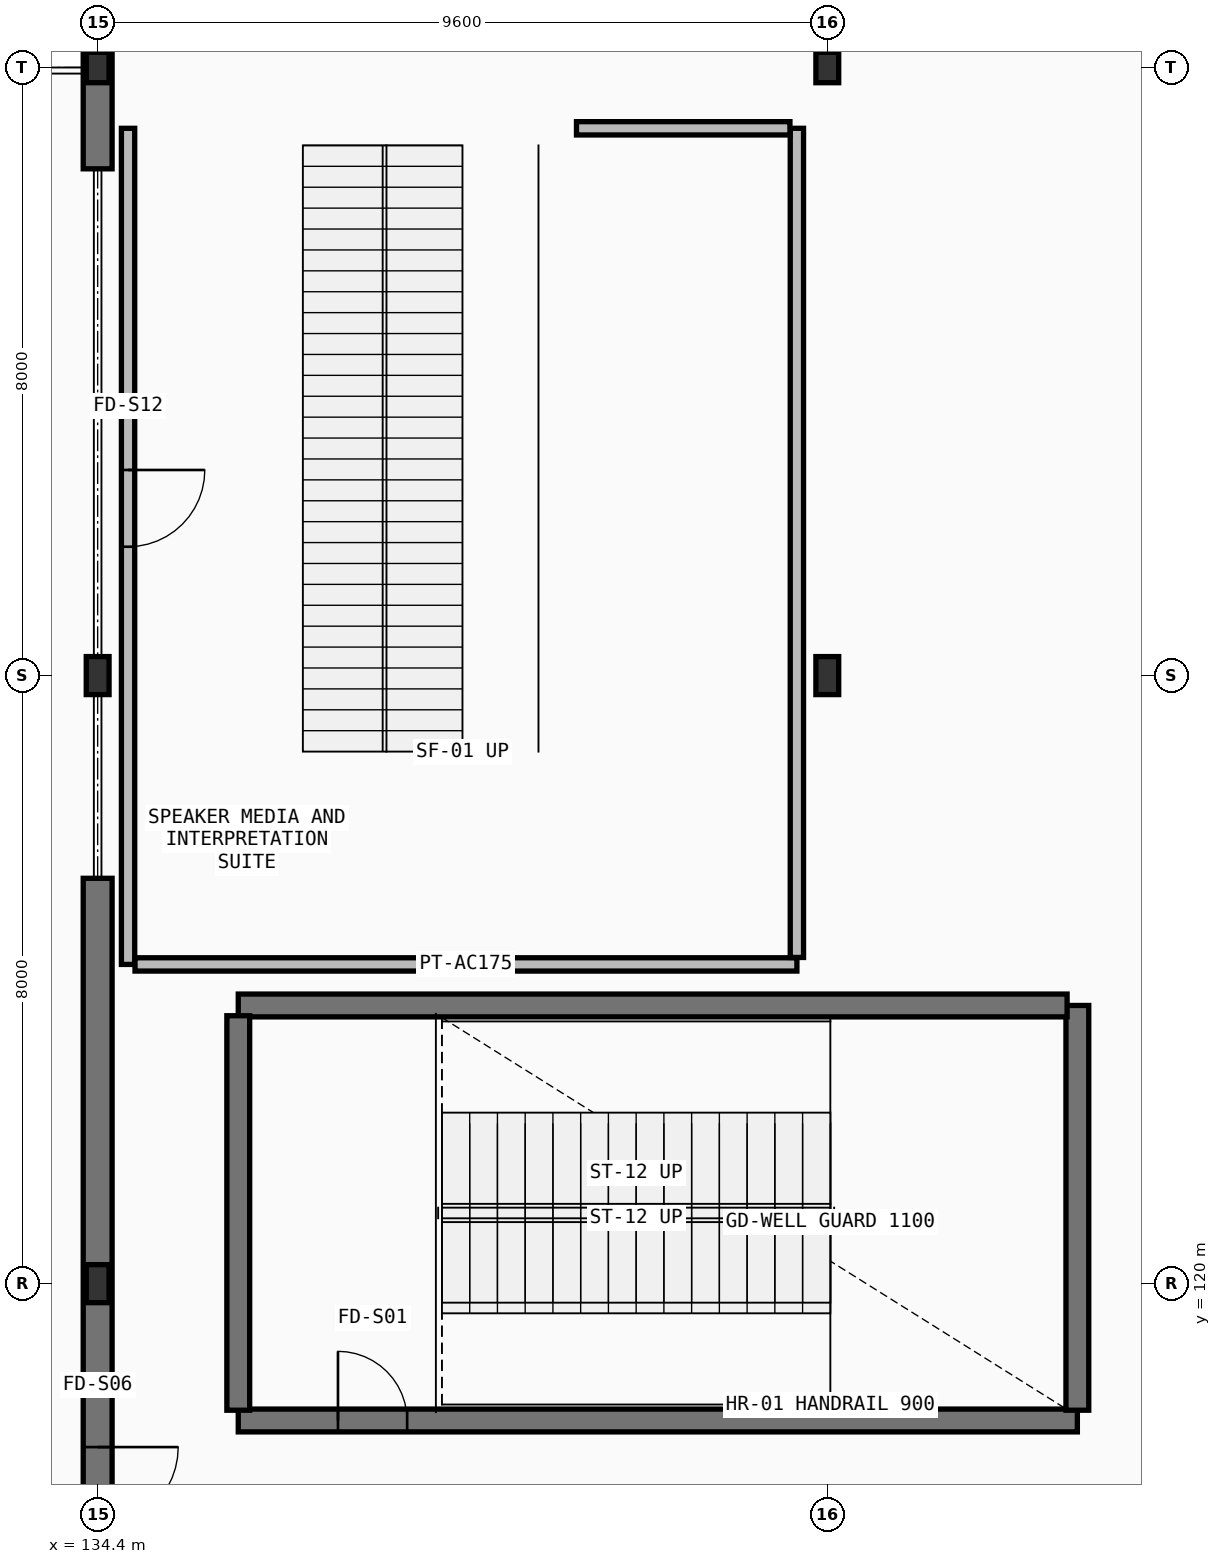
"""IFC4 building model, lengths in metres.
Left out: names, types, materials, properties, quantities, classifications, styles, units other than length and angle.
Written with IfcOpenShell. Run it as: python <this file> out.ifc"""

import sys

from ifc_helpers import new_model, si_unit, direction, frame, frame_2d, origin, origin_2d, place, context, subcontext, project, spatial, rectangle, i_section, extrude, element, fill, save


model = new_model("IFC4")
c1 = context("Model", 3, precision=1e-05, world=origin(), true_north=direction((0.0, 1.0)))
c2 = subcontext(c1, "Body", "Model", "MODEL_VIEW")
j1 = project(units=[si_unit("LENGTHUNIT", "METRE"), si_unit("PLANEANGLEUNIT", "RADIAN")], contexts=[c1])
p1 = place(None, origin())
s1 = spatial("IfcSite", under=j1, at=p1, CompositionType="ELEMENT")
p2 = place(p1, origin())
s2 = spatial("IfcBuilding", under=s1, at=p2, CompositionType="ELEMENT")
p3 = place(p2, frame((0.0, 0.0, 6.0)))
s3 = spatial("IfcBuildingStorey", under=s2, at=p3, CompositionType="ELEMENT", Elevation=6.0)
for number, where, z_axis, x_axis in (
    (1, (134.4, 120.0, 0.0), (0.0, 0.0, 1.0), (1.0, 0.0, 0.0)),
    (2, (134.4, 128.0, 0.0), (0.0, 0.0, 1.0), (1.0, 0.0, 0.0)),
):
    element("IfcColumn", number, at=place(p3, frame(where, z_axis=z_axis, x_axis=x_axis)), inside=s3, PredefinedType="COLUMN", context=c2, shape_type="SweptSolid", body=[
        extrude(i_section(OverallWidth=0.3, OverallDepth=0.5, WebThickness=0.014, FlangeThickness=0.028, FilletRadius=0.027, at=origin_2d()), origin(), (0.0, 0.0, 1.0), 5.4),
    ])
p4 = place(p3, frame((134.4, 136.0, 0.0), z_axis=(0.0, 0.0, 1.0), x_axis=(1.0, 0.0, 0.0)))
e3 = element("IfcColumn", 3, at=p4, inside=s3, PredefinedType="COLUMN", context=c2, shape_type="SweptSolid", body=[
    extrude(i_section(OverallWidth=0.3, OverallDepth=0.4, WebThickness=0.013, FlangeThickness=0.024, FilletRadius=0.027, at=origin_2d()), origin(), (0.0, 0.0, 1.0), 5.4),
])
p5 = place(p3, frame((144.0, 128.0, 0.0), z_axis=(0.0, 0.0, 1.0), x_axis=(1.0, 0.0, 0.0)))
e4 = element("IfcColumn", 4, at=p5, inside=s3, PredefinedType="COLUMN", context=c2, shape_type="SweptSolid", body=[
    extrude(i_section(OverallWidth=0.3, OverallDepth=0.5, WebThickness=0.014, FlangeThickness=0.028, FilletRadius=0.027, at=origin_2d()), origin(), (0.0, 0.0, 1.0), 5.4),
])
p6 = place(p3, frame((144.0, 136.0, 0.0), z_axis=(0.0, 0.0, 1.0), x_axis=(1.0, 0.0, 0.0)))
e5 = element("IfcColumn", 5, at=p6, inside=s3, PredefinedType="COLUMN", context=c2, shape_type="SweptSolid", body=[
    extrude(i_section(OverallWidth=0.3, OverallDepth=0.4, WebThickness=0.013, FlangeThickness=0.024, FilletRadius=0.027, at=origin_2d()), origin(), (0.0, 0.0, 1.0), 5.4),
])
p7 = place(p3, frame((134.4, 143.825, 0.0), z_axis=(0.0, 0.0, 1.0), x_axis=(0.0, -1.0, 0.0)))
e6 = element("IfcWall", 6, at=p7, inside=s3, PredefinedType="SOLIDWALL", context=c2, shape_type="SweptSolid", body=[
    extrude(rectangle(XDim=9.158, YDim=0.38, at=frame_2d((4.579, 0.0))), origin(), (0.0, 0.0, 1.0), 4.9),
])
p8 = place(p7, frame((2.654, 0.0, 0.9)))
e7 = element("IfcOpeningElement", 7, at=p8, cuts=e6, PredefinedType="OPENING", context=c2, shape_type="SweptSolid", body=[
    extrude(rectangle(XDim=3.85, YDim=2.35, at=frame_2d((1.925, 1.175))), frame((0.0, 0.2, 0.0), z_axis=(0.0, -1.0, 0.0), x_axis=(1.0, 0.0, 0.0)), (0.0, 0.0, 1.0), 0.4),
])
p9 = place(p3, frame((134.4, 125.333, 0.0), z_axis=(0.0, 0.0, 1.0), x_axis=(0.0, -1.0, 0.0)))
e8 = element("IfcWall", 8, at=p9, inside=s3, PredefinedType="SOLIDWALL", context=c2, shape_type="SweptSolid", body=[
    extrude(rectangle(XDim=9.333, YDim=0.38, at=frame_2d((4.667, 0.0))), origin(), (0.0, 0.0, 1.0), 4.9),
])
p10 = place(p9, frame((7.483, 0.0, 0.0)))
e9 = element("IfcOpeningElement", 9, at=p10, cuts=e8, PredefinedType="OPENING", context=c2, shape_type="SweptSolid", body=[
    extrude(rectangle(XDim=1.06, YDim=2.16, at=frame_2d((0.53, 1.08))), frame((0.0, 0.2, 0.0), z_axis=(0.0, -1.0, 0.0), x_axis=(1.0, 0.0, 0.0)), (0.0, 0.0, 1.0), 0.4),
])
p11 = place(p3, frame((136.25, 118.2, 0.0), z_axis=(0.0, 0.0, 1.0), x_axis=(1.0, 0.0, 0.0)))
e10 = element("IfcWall", 10, at=p11, inside=s3, PredefinedType="SHEAR", context=c2, shape_type="SweptSolid", body=[
    extrude(rectangle(XDim=11.04, YDim=0.3, at=frame_2d((5.52, 0.0))), origin(), (0.0, 0.0, 1.0), 5.04),
])
p12 = place(p11, frame((1.312, 0.0, 0.0)))
e11 = element("IfcOpeningElement", 11, at=p12, cuts=e10, PredefinedType="OPENING", context=c2, shape_type="SweptSolid", body=[
    extrude(rectangle(XDim=0.91, YDim=2.08, at=frame_2d((0.455, 1.04))), frame((0.0, 0.16, 0.0), z_axis=(0.0, -1.0, 0.0), x_axis=(1.0, 0.0, 0.0)), (0.0, 0.0, 1.0), 0.32),
])
p13 = place(p3, frame((147.29, 118.335, 0.0), z_axis=(0.0, 0.0, 1.0), x_axis=(0.0, 1.0, 0.0)))
e12 = element("IfcWall", 12, at=p13, inside=s3, PredefinedType="SHEAR", context=c2, shape_type="SweptSolid", body=[
    extrude(rectangle(XDim=5.325, YDim=0.3, at=frame_2d((2.663, 0.0))), origin(), (0.0, 0.0, 1.0), 5.04),
])
p14 = place(p3, frame((147.155, 123.66, 0.0), z_axis=(0.0, 0.0, 1.0), x_axis=(-1.0, 0.0, 0.0)))
e13 = element("IfcWall", 13, at=p14, inside=s3, PredefinedType="SHEAR", context=c2, shape_type="SweptSolid", body=[
    extrude(rectangle(XDim=10.905, YDim=0.3, at=frame_2d((5.453, 0.0))), origin(), (0.0, 0.0, 1.0), 5.04),
])
p15 = place(p3, frame((136.25, 123.525, 0.0), z_axis=(0.0, 0.0, 1.0), x_axis=(0.0, -1.0, 0.0)))
e14 = element("IfcWall", 14, at=p15, inside=s3, PredefinedType="SHEAR", context=c2, shape_type="SweptSolid", body=[
    extrude(rectangle(XDim=5.19, YDim=0.3, at=frame_2d((2.595, 0.0))), origin(), (0.0, 0.0, 1.0), 5.04),
])
p16 = place(p3, frame((134.8, 135.2, 0.0), z_axis=(0.0, 0.0, 1.0), x_axis=(0.0, -1.0, 0.0)))
e15 = element("IfcWall", 15, at=p16, inside=s3, PredefinedType="PARTITIONING", context=c2, shape_type="SweptSolid", body=[
    extrude(rectangle(XDim=11.0, YDim=0.175, at=frame_2d((5.5, 0.0))), origin(), (0.0, 0.0, 1.0), 5.04),
])
p17 = place(p16, frame((4.495, 0.0, 0.0)))
e16 = element("IfcOpeningElement", 16, at=p17, cuts=e15, PredefinedType="OPENING", context=c2, shape_type="SweptSolid", body=[
    extrude(rectangle(XDim=1.01, YDim=2.22, at=frame_2d((0.505, 1.11))), frame((0.0, 0.097, 0.0), z_axis=(0.0, -1.0, 0.0), x_axis=(1.0, 0.0, 0.0)), (0.0, 0.0, 1.0), 0.195),
])
p18 = place(p3, frame((134.892, 124.2, 0.0), z_axis=(0.0, 0.0, 1.0), x_axis=(1.0, 0.0, 0.0)))
e17 = element("IfcWall", 17, at=p18, inside=s3, PredefinedType="PARTITIONING", context=c2, shape_type="SweptSolid", body=[
    extrude(rectangle(XDim=8.708, YDim=0.175, at=frame_2d((4.354, 0.0))), origin(), (0.0, 0.0, 1.0), 5.04),
])
p19 = place(p3, frame((143.6, 124.292, 0.0), z_axis=(0.0, 0.0, 1.0), x_axis=(0.0, 1.0, 0.0)))
e18 = element("IfcWall", 18, at=p19, inside=s3, PredefinedType="PARTITIONING", context=c2, shape_type="SweptSolid", body=[
    extrude(rectangle(XDim=10.908, YDim=0.175, at=frame_2d((5.454, 0.0))), origin(), (0.0, 0.0, 1.0), 5.04),
])
p20 = place(p3, frame((143.509, 135.2, 0.0), z_axis=(0.0, 0.0, 1.0), x_axis=(-1.0, 0.0, 0.0)))
e19 = element("IfcWall", 19, at=p20, inside=s3, PredefinedType="PARTITIONING", context=c2, shape_type="SweptSolid", body=[
    extrude(rectangle(XDim=2.809, YDim=0.175, at=frame_2d((1.404, 0.0))), origin(), (0.0, 0.0, 1.0), 5.17),
])
p21 = place(p12, origin())
e20 = element("IfcDoor", 20, at=p21, inside=s3, OperationType="SINGLE_SWING_RIGHT", PredefinedType="DOOR", context=c2, shape_type="SweptSolid", body=[
    extrude(rectangle(XDim=0.91, YDim=2.08, at=frame_2d((0.455, 1.04))), frame((0.0, 0.025, 0.0), z_axis=(0.0, -1.0, 0.0), x_axis=(1.0, 0.0, 0.0)), (0.0, 0.0, 1.0), 0.05),
])
fill(e11, e20)
p22 = place(p17, origin())
e21 = element("IfcDoor", 21, at=p22, inside=s3, OperationType="SINGLE_SWING_LEFT", PredefinedType="DOOR", context=c2, shape_type="SweptSolid", body=[
    extrude(rectangle(XDim=1.01, YDim=2.22, at=frame_2d((0.505, 1.11))), frame((0.0, 0.025, 0.0), z_axis=(0.0, -1.0, 0.0), x_axis=(1.0, 0.0, 0.0)), (0.0, 0.0, 1.0), 0.05),
])
fill(e16, e21)
p23 = place(p10, origin())
e22 = element("IfcDoor", 22, at=p23, inside=s3, OperationType="SINGLE_SWING_LEFT", PredefinedType="DOOR", context=c2, shape_type="SweptSolid", body=[
    extrude(rectangle(XDim=1.06, YDim=2.16, at=frame_2d((0.53, 1.08))), frame((0.0, 0.025, 0.0), z_axis=(0.0, -1.0, 0.0), x_axis=(1.0, 0.0, 0.0)), (0.0, 0.0, 1.0), 0.05),
])
fill(e9, e22)
save(model, sys.argv[1])
